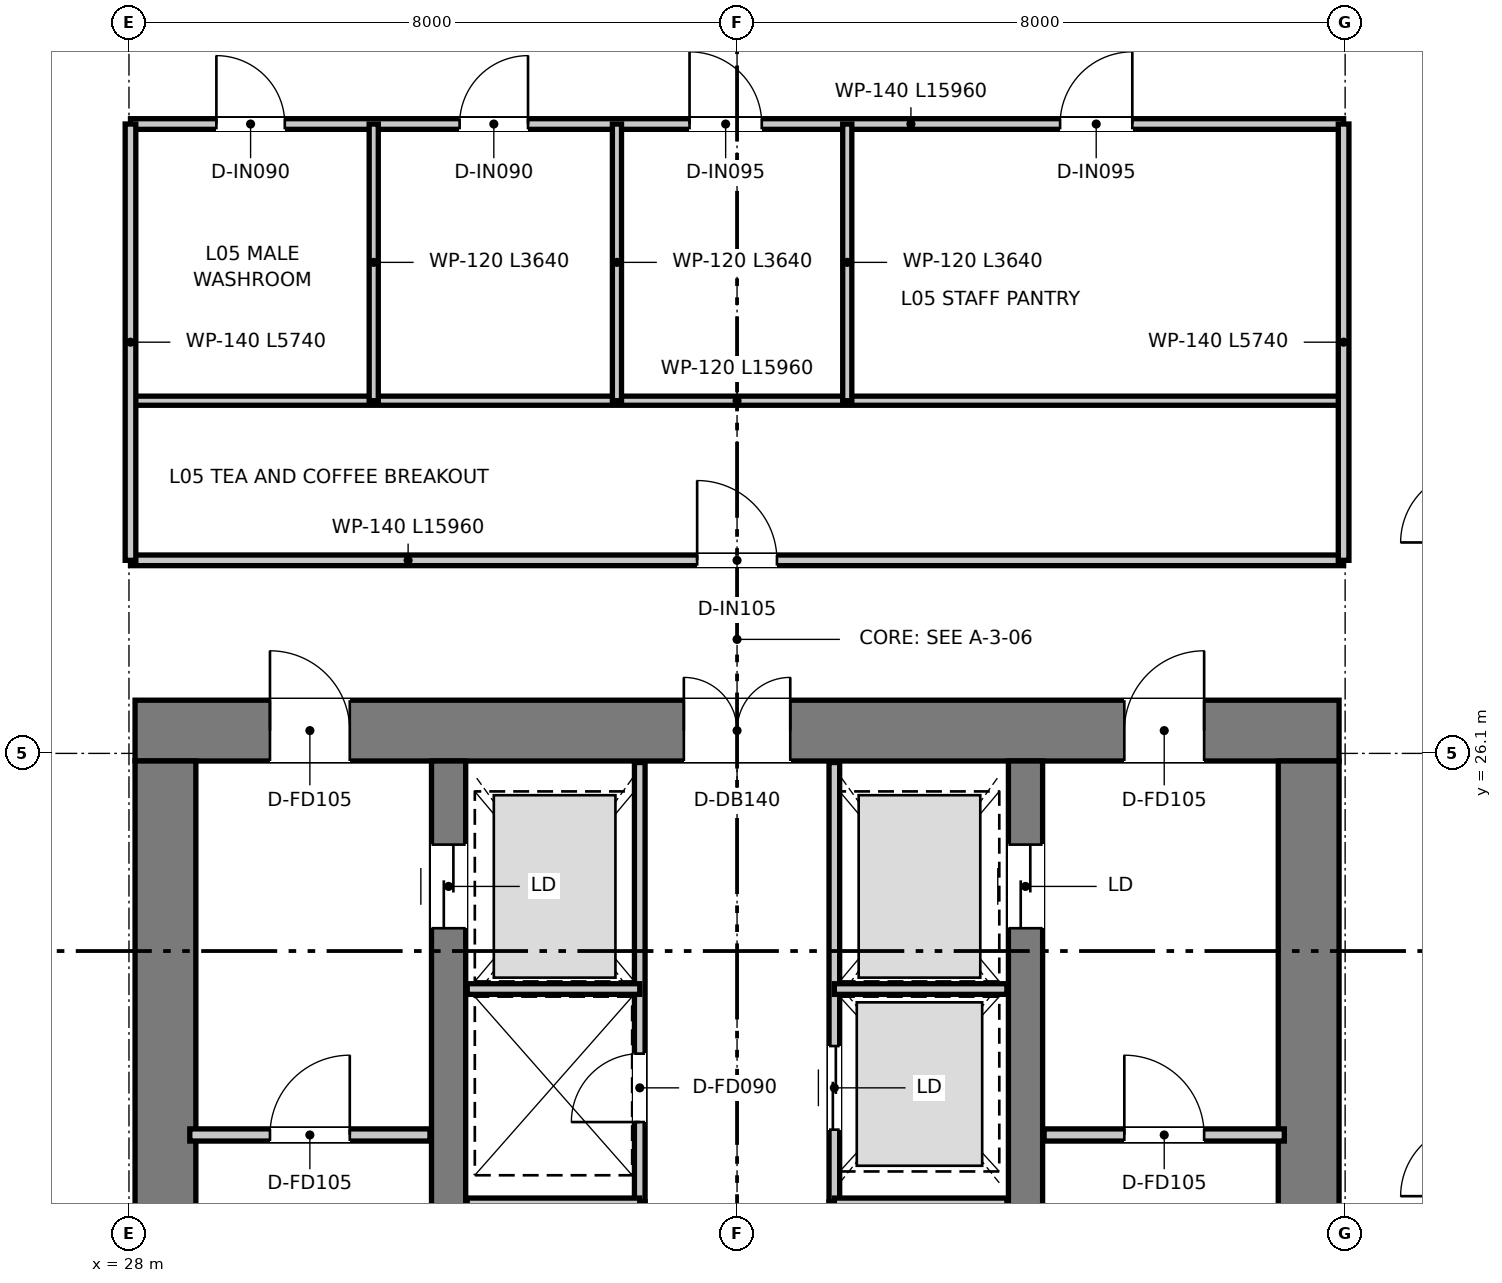
"""IFC4 building model, lengths in metres.
Left out: names, types, materials, properties, quantities, classifications, styles, units other than length and angle.
Written with IfcOpenShell. Run it as: python <this file> out.ifc"""

import sys

from ifc_helpers import new_model, si_unit, direction, frame, frame_2d, origin, place, context, subcontext, project, spatial, rectangle, extrude, element, fill, save


model = new_model("IFC4")
c1 = context("Model", 3, precision=1e-05, world=origin(), true_north=direction((0.0, 1.0)))
c2 = subcontext(c1, "Body", "Model", "MODEL_VIEW")
j1 = project(units=[si_unit("LENGTHUNIT", "METRE"), si_unit("PLANEANGLEUNIT", "RADIAN")], contexts=[c1])
p1 = place(None, origin())
s1 = spatial("IfcSite", under=j1, at=p1, CompositionType="ELEMENT")
p2 = place(p1, origin())
s2 = spatial("IfcBuilding", under=s1, at=p2, CompositionType="ELEMENT")
p3 = place(p2, frame((0.0, 0.0, 25.0)))
s3 = spatial("IfcBuildingStorey", under=s2, at=p3, CompositionType="ELEMENT", Elevation=25.0)
p4 = place(p3, frame((28.08, 26.4, 0.0), z_axis=(0.0, 0.0, 1.0), x_axis=(1.0, 0.0, 0.0)))
e1 = element("IfcWall", 1, at=p4, inside=s3, PredefinedType="SHEAR", context=c2, shape_type="SweptSolid", body=[
    extrude(rectangle(XDim=15.84, YDim=0.8, at=frame_2d((7.92, 0.0))), origin(), (0.0, 0.0, 1.0), 3.95),
])
p5 = place(p4, frame((7.22, 0.0, 0.0)))
e2 = element("IfcOpeningElement", 2, at=p5, cuts=e1, PredefinedType="OPENING", context=c2, shape_type="SweptSolid", body=[
    extrude(rectangle(XDim=1.4, YDim=2.2, at=frame_2d((0.7, 1.1))), frame((0.0, 0.41, 0.0), z_axis=(0.0, -1.0, 0.0), x_axis=(1.0, 0.0, 0.0)), (0.0, 0.0, 1.0), 0.82),
])
p6 = place(p4, frame((1.775, 0.0, 0.0)))
e3 = element("IfcOpeningElement", 3, at=p6, cuts=e1, PredefinedType="OPENING", context=c2, shape_type="SweptSolid", body=[
    extrude(rectangle(XDim=1.05, YDim=2.1, at=frame_2d((0.525, 1.05))), frame((0.0, 0.41, 0.0), z_axis=(0.0, -1.0, 0.0), x_axis=(1.0, 0.0, 0.0)), (0.0, 0.0, 1.0), 0.82),
])
p7 = place(p4, frame((13.015, 0.0, 0.0)))
e4 = element("IfcOpeningElement", 4, at=p7, cuts=e1, PredefinedType="OPENING", context=c2, shape_type="SweptSolid", body=[
    extrude(rectangle(XDim=1.05, YDim=2.1, at=frame_2d((0.525, 1.05))), frame((0.0, 0.41, 0.0), z_axis=(0.0, -1.0, 0.0), x_axis=(1.0, 0.0, 0.0)), (0.0, 0.0, 1.0), 0.82),
])
for number, where, z_axis, x_axis in (
    (5, (28.48, 11.3, 0.0), (0.0, 0.0, 1.0), (0.0, 1.0, 0.0)),
    (6, (43.52, 11.3, 0.0), (0.0, 0.0, 1.0), (0.0, 1.0, 0.0)),
):
    element("IfcWall", number, at=place(p3, frame(where, z_axis=z_axis, x_axis=x_axis)), inside=s3, PredefinedType="SHEAR", context=c2, shape_type="SweptSolid", body=[
        extrude(rectangle(XDim=14.7, YDim=0.8, at=frame_2d((7.35, 0.0))), origin(), (0.0, 0.0, 1.0), 3.95),
    ])
p8 = place(p3, frame((32.205, 13.22, 0.0), z_axis=(0.0, 0.0, 1.0), x_axis=(0.0, 1.0, 0.0)))
e7 = element("IfcWall", 7, at=p8, inside=s3, PredefinedType="SHEAR", context=c2, shape_type="SweptSolid", body=[
    extrude(rectangle(XDim=12.78, YDim=0.45, at=frame_2d((6.39, 0.0))), origin(), (0.0, 0.0, 1.0), 3.95),
])
p9 = place(p8, frame((10.58, 0.0, 0.0)))
e8 = element("IfcOpeningElement", 8, at=p9, cuts=e7, PredefinedType="OPENING", context=c2, shape_type="SweptSolid", body=[
    extrude(rectangle(XDim=1.1, YDim=2.15, at=frame_2d((0.55, 1.075))), frame((0.0, 0.235, 0.0), z_axis=(0.0, -1.0, 0.0), x_axis=(1.0, 0.0, 0.0)), (0.0, 0.0, 1.0), 0.47),
])
p10 = place(p3, frame((39.795, 13.22, 0.0), z_axis=(0.0, 0.0, 1.0), x_axis=(0.0, 1.0, 0.0)))
e9 = element("IfcWall", 9, at=p10, inside=s3, PredefinedType="SHEAR", context=c2, shape_type="SweptSolid", body=[
    extrude(rectangle(XDim=12.78, YDim=0.45, at=frame_2d((6.39, 0.0))), origin(), (0.0, 0.0, 1.0), 3.95),
])
p11 = place(p10, frame((10.58, 0.0, 0.0)))
e10 = element("IfcOpeningElement", 10, at=p11, cuts=e9, PredefinedType="OPENING", context=c2, shape_type="SweptSolid", body=[
    extrude(rectangle(XDim=1.1, YDim=2.15, at=frame_2d((0.55, 1.075))), frame((0.0, 0.235, 0.0), z_axis=(0.0, -1.0, 0.0), x_axis=(1.0, 0.0, 0.0)), (0.0, 0.0, 1.0), 0.47),
])
p12 = place(p3, frame((28.8, 21.08, 0.0), z_axis=(0.0, 0.0, 1.0), x_axis=(1.0, 0.0, 0.0)))
e11 = element("IfcWall", 11, at=p12, inside=s3, PredefinedType="PARTITIONING", context=c2, shape_type="SweptSolid", body=[
    extrude(rectangle(XDim=3.16, YDim=0.16, at=frame_2d((1.58, 0.0))), origin(), (0.0, 0.0, 1.0), 3.67),
])
p13 = place(p12, frame((1.055, 0.0, 0.0)))
e12 = element("IfcOpeningElement", 12, at=p13, cuts=e11, PredefinedType="OPENING", context=c2, shape_type="SweptSolid", body=[
    extrude(rectangle(XDim=1.05, YDim=2.1, at=frame_2d((0.525, 1.05))), frame((0.0, 0.09, 0.0), z_axis=(0.0, -1.0, 0.0), x_axis=(1.0, 0.0, 0.0)), (0.0, 0.0, 1.0), 0.18),
])
p14 = place(p3, frame((40.04, 21.08, 0.0), z_axis=(0.0, 0.0, 1.0), x_axis=(1.0, 0.0, 0.0)))
e13 = element("IfcWall", 13, at=p14, inside=s3, PredefinedType="PARTITIONING", context=c2, shape_type="SweptSolid", body=[
    extrude(rectangle(XDim=3.16, YDim=0.16, at=frame_2d((1.58, 0.0))), origin(), (0.0, 0.0, 1.0), 3.67),
])
p15 = place(p14, frame((1.055, 0.0, 0.0)))
e14 = element("IfcOpeningElement", 14, at=p15, cuts=e13, PredefinedType="OPENING", context=c2, shape_type="SweptSolid", body=[
    extrude(rectangle(XDim=1.05, YDim=2.1, at=frame_2d((0.525, 1.05))), frame((0.0, 0.09, 0.0), z_axis=(0.0, -1.0, 0.0), x_axis=(1.0, 0.0, 0.0)), (0.0, 0.0, 1.0), 0.18),
])
p16 = place(p3, frame((34.72, 20.2, 0.0), z_axis=(0.0, 0.0, 1.0), x_axis=(0.0, 1.0, 0.0)))
e15 = element("IfcWall", 15, at=p16, inside=s3, PredefinedType="PARTITIONING", context=c2, shape_type="SweptSolid", body=[
    extrude(rectangle(XDim=5.78, YDim=0.14, at=frame_2d((2.89, 0.0))), origin(), (0.0, 0.0, 1.0), 2.47),
])
p17 = place(p16, frame((1.05, 0.0, 0.0)))
e16 = element("IfcOpeningElement", 16, at=p17, cuts=e15, PredefinedType="OPENING", context=c2, shape_type="SweptSolid", body=[
    extrude(rectangle(XDim=0.9, YDim=2.1, at=frame_2d((0.45, 1.05))), frame((0.0, 0.08, 0.0), z_axis=(0.0, -1.0, 0.0), x_axis=(1.0, 0.0, 0.0)), (0.0, 0.0, 1.0), 0.16),
])
p18 = place(p3, frame((37.28, 20.2, 0.0), z_axis=(0.0, 0.0, 1.0), x_axis=(0.0, 1.0, 0.0)))
e17 = element("IfcWall", 17, at=p18, inside=s3, PredefinedType="PARTITIONING", context=c2, shape_type="SweptSolid", body=[
    extrude(rectangle(XDim=5.78, YDim=0.14, at=frame_2d((2.89, 0.0))), origin(), (0.0, 0.0, 1.0), 2.47),
])
p19 = place(p18, frame((0.95, 0.0, 0.0)))
e18 = element("IfcOpeningElement", 18, at=p19, cuts=e17, PredefinedType="OPENING", context=c2, shape_type="SweptSolid", body=[
    extrude(rectangle(XDim=1.1, YDim=2.15, at=frame_2d((0.55, 1.075))), frame((0.0, 0.08, 0.0), z_axis=(0.0, -1.0, 0.0), x_axis=(1.0, 0.0, 0.0)), (0.0, 0.0, 1.0), 0.16),
])
for number, where, z_axis, x_axis in (
    (19, (32.45, 23.0, 0.0), (0.0, 0.0, 1.0), (1.0, 0.0, 0.0)),
    (20, (37.28, 23.0, 0.0), (0.0, 0.0, 1.0), (1.0, 0.0, 0.0)),
):
    element("IfcWall", number, at=place(p3, frame(where, z_axis=z_axis, x_axis=x_axis)), inside=s3, PredefinedType="PARTITIONING", context=c2, shape_type="SweptSolid", body=[
        extrude(rectangle(XDim=2.27, YDim=0.14, at=frame_2d((1.135, 0.0))), origin(), (0.0, 0.0, 1.0), 2.47),
    ])
for number, where, z_axis, x_axis in (
    (21, (34.72, 17.78, 0.0), (0.0, 0.0, 1.0), (0.0, 1.0, 0.0)),
    (22, (37.28, 17.78, 0.0), (0.0, 0.0, 1.0), (0.0, 1.0, 0.0)),
):
    element("IfcWall", number, at=place(p3, frame(where, z_axis=z_axis, x_axis=x_axis)), inside=s3, PredefinedType="PARTITIONING", context=c2, shape_type="SweptSolid", body=[
        extrude(rectangle(XDim=2.42, YDim=0.14, at=frame_2d((1.21, 0.0))), origin(), (0.0, 0.0, 1.0), 3.67),
    ])
for number, where, z_axis, x_axis in (
    (23, (32.45, 20.18, 0.0), (0.0, 0.0, 1.0), (1.0, 0.0, 0.0)),
    (24, (37.28, 20.18, 0.0), (0.0, 0.0, 1.0), (1.0, 0.0, 0.0)),
):
    element("IfcWall", number, at=place(p3, frame(where, z_axis=z_axis, x_axis=x_axis)), inside=s3, PredefinedType="PARTITIONING", context=c2, shape_type="SweptSolid", body=[
        extrude(rectangle(XDim=2.27, YDim=0.14, at=frame_2d((1.135, 0.0))), origin(), (0.0, 0.0, 1.0), 3.67),
    ])
p20 = place(p3, frame((28.02, 28.64, 0.0), z_axis=(0.0, 0.0, 1.0), x_axis=(1.0, 0.0, 0.0)))
e25 = element("IfcWall", 25, at=p20, inside=s3, PredefinedType="PARTITIONING", context=c2, shape_type="SweptSolid", body=[
    extrude(rectangle(XDim=15.96, YDim=0.14, at=frame_2d((7.98, 0.0))), origin(), (0.0, 0.0, 1.0), 3.08),
])
p21 = place(p20, frame((7.455, 0.0, 0.0)))
e26 = element("IfcOpeningElement", 26, at=p21, cuts=e25, PredefinedType="OPENING", context=c2, shape_type="SweptSolid", body=[
    extrude(rectangle(XDim=1.05, YDim=2.15, at=frame_2d((0.525, 1.075))), frame((0.0, 0.08, 0.0), z_axis=(0.0, -1.0, 0.0), x_axis=(1.0, 0.0, 0.0)), (0.0, 0.0, 1.0), 0.16),
])
p22 = place(p3, frame((28.02, 30.74, 0.0), z_axis=(0.0, 0.0, 1.0), x_axis=(1.0, 0.0, 0.0)))
e27 = element("IfcWall", 27, at=p22, inside=s3, PredefinedType="PARTITIONING", context=c2, shape_type="SweptSolid", body=[
    extrude(rectangle(XDim=15.96, YDim=0.12, at=frame_2d((7.98, 0.0))), origin(), (0.0, 0.0, 1.0), 3.08),
])
p23 = place(p3, frame((28.02, 34.38, 0.0), z_axis=(0.0, 0.0, 1.0), x_axis=(1.0, 0.0, 0.0)))
e28 = element("IfcWall", 28, at=p23, inside=s3, PredefinedType="PARTITIONING", context=c2, shape_type="SweptSolid", body=[
    extrude(rectangle(XDim=15.96, YDim=0.14, at=frame_2d((7.98, 0.0))), origin(), (0.0, 0.0, 1.0), 3.08),
])
p24 = place(p23, frame((1.13, 0.0, 0.0)))
e29 = element("IfcOpeningElement", 29, at=p24, cuts=e28, PredefinedType="OPENING", context=c2, shape_type="SweptSolid", body=[
    extrude(rectangle(XDim=0.9, YDim=2.1, at=frame_2d((0.45, 1.05))), frame((0.0, 0.08, 0.0), z_axis=(0.0, -1.0, 0.0), x_axis=(1.0, 0.0, 0.0)), (0.0, 0.0, 1.0), 0.16),
])
p25 = place(p23, frame((4.33, 0.0, 0.0)))
e30 = element("IfcOpeningElement", 30, at=p25, cuts=e28, PredefinedType="OPENING", context=c2, shape_type="SweptSolid", body=[
    extrude(rectangle(XDim=0.9, YDim=2.1, at=frame_2d((0.45, 1.05))), frame((0.0, 0.08, 0.0), z_axis=(0.0, -1.0, 0.0), x_axis=(1.0, 0.0, 0.0)), (0.0, 0.0, 1.0), 0.16),
])
p26 = place(p23, frame((7.355, 0.0, 0.0)))
e31 = element("IfcOpeningElement", 31, at=p26, cuts=e28, PredefinedType="OPENING", context=c2, shape_type="SweptSolid", body=[
    extrude(rectangle(XDim=0.95, YDim=2.1, at=frame_2d((0.475, 1.05))), frame((0.0, 0.08, 0.0), z_axis=(0.0, -1.0, 0.0), x_axis=(1.0, 0.0, 0.0)), (0.0, 0.0, 1.0), 0.16),
])
p27 = place(p23, frame((12.23, 0.0, 0.0)))
e32 = element("IfcOpeningElement", 32, at=p27, cuts=e28, PredefinedType="OPENING", context=c2, shape_type="SweptSolid", body=[
    extrude(rectangle(XDim=0.95, YDim=2.1, at=frame_2d((0.475, 1.05))), frame((0.0, 0.08, 0.0), z_axis=(0.0, -1.0, 0.0), x_axis=(1.0, 0.0, 0.0)), (0.0, 0.0, 1.0), 0.16),
])
for number, where, z_axis, x_axis in (
    (33, (28.02, 28.64, 0.0), (0.0, 0.0, 1.0), (0.0, 1.0, 0.0)),
    (34, (43.98, 28.64, 0.0), (0.0, 0.0, 1.0), (0.0, 1.0, 0.0)),
):
    element("IfcWall", number, at=place(p3, frame(where, z_axis=z_axis, x_axis=x_axis)), inside=s3, PredefinedType="PARTITIONING", context=c2, shape_type="SweptSolid", body=[
        extrude(rectangle(XDim=5.74, YDim=0.14, at=frame_2d((2.87, 0.0))), origin(), (0.0, 0.0, 1.0), 3.22),
    ])
for number, where, z_axis, x_axis in (
    (35, (31.22, 30.74, 0.0), (0.0, 0.0, 1.0), (0.0, 1.0, 0.0)),
    (36, (34.42, 30.74, 0.0), (0.0, 0.0, 1.0), (0.0, 1.0, 0.0)),
    (37, (37.45, 30.74, 0.0), (0.0, 0.0, 1.0), (0.0, 1.0, 0.0)),
):
    element("IfcWall", number, at=place(p3, frame(where, z_axis=z_axis, x_axis=x_axis)), inside=s3, PredefinedType="PARTITIONING", context=c2, shape_type="SweptSolid", body=[
        extrude(rectangle(XDim=3.64, YDim=0.12, at=frame_2d((1.82, 0.0))), origin(), (0.0, 0.0, 1.0), 3.12),
    ])
p28 = place(p13, origin())
e38 = element("IfcDoor", 38, at=p28, inside=s3, OperationType="SINGLE_SWING_RIGHT", PredefinedType="DOOR", context=c2, shape_type="SweptSolid", body=[
    extrude(rectangle(XDim=1.05, YDim=2.1, at=frame_2d((0.525, 1.05))), frame((0.0, 0.025, 0.0), z_axis=(0.0, -1.0, 0.0), x_axis=(1.0, 0.0, 0.0)), (0.0, 0.0, 1.0), 0.05),
])
fill(e12, e38)
p29 = place(p15, origin())
e39 = element("IfcDoor", 39, at=p29, inside=s3, OperationType="SINGLE_SWING_LEFT", PredefinedType="DOOR", context=c2, shape_type="SweptSolid", body=[
    extrude(rectangle(XDim=1.05, YDim=2.1, at=frame_2d((0.525, 1.05))), frame((0.0, 0.025, 0.0), z_axis=(0.0, -1.0, 0.0), x_axis=(1.0, 0.0, 0.0)), (0.0, 0.0, 1.0), 0.05),
])
fill(e14, e39)
p30 = place(p5, origin())
e40 = element("IfcDoor", 40, at=p30, inside=s3, OperationType="DOUBLE_DOOR_SINGLE_SWING", PredefinedType="DOOR", context=c2, shape_type="SweptSolid", body=[
    extrude(rectangle(XDim=1.4, YDim=2.2, at=frame_2d((0.7, 1.1))), frame((0.0, 0.025, 0.0), z_axis=(0.0, -1.0, 0.0), x_axis=(1.0, 0.0, 0.0)), (0.0, 0.0, 1.0), 0.05),
])
fill(e2, e40)
p31 = place(p6, origin())
e41 = element("IfcDoor", 41, at=p31, inside=s3, OperationType="SINGLE_SWING_LEFT", PredefinedType="DOOR", context=c2, shape_type="SweptSolid", body=[
    extrude(rectangle(XDim=1.05, YDim=2.1, at=frame_2d((0.525, 1.05))), frame((0.0, 0.025, 0.0), z_axis=(0.0, -1.0, 0.0), x_axis=(1.0, 0.0, 0.0)), (0.0, 0.0, 1.0), 0.05),
])
fill(e3, e41)
p32 = place(p7, origin())
e42 = element("IfcDoor", 42, at=p32, inside=s3, OperationType="SINGLE_SWING_RIGHT", PredefinedType="DOOR", context=c2, shape_type="SweptSolid", body=[
    extrude(rectangle(XDim=1.05, YDim=2.1, at=frame_2d((0.525, 1.05))), frame((0.0, 0.025, 0.0), z_axis=(0.0, -1.0, 0.0), x_axis=(1.0, 0.0, 0.0)), (0.0, 0.0, 1.0), 0.05),
])
fill(e4, e42)
p33 = place(p9, origin())
e43 = element("IfcDoor", 43, at=p33, inside=s3, OperationType="DOUBLE_DOOR_SLIDING", PredefinedType="DOOR", context=c2, shape_type="SweptSolid", body=[
    extrude(rectangle(XDim=1.1, YDim=2.15, at=frame_2d((0.55, 1.075))), frame((0.0, 0.025, 0.0), z_axis=(0.0, -1.0, 0.0), x_axis=(1.0, 0.0, 0.0)), (0.0, 0.0, 1.0), 0.05),
])
fill(e8, e43)
p34 = place(p11, origin())
e44 = element("IfcDoor", 44, at=p34, inside=s3, OperationType="DOUBLE_DOOR_SLIDING", PredefinedType="DOOR", context=c2, shape_type="SweptSolid", body=[
    extrude(rectangle(XDim=1.1, YDim=2.15, at=frame_2d((0.55, 1.075))), frame((0.0, 0.025, 0.0), z_axis=(0.0, -1.0, 0.0), x_axis=(1.0, 0.0, 0.0)), (0.0, 0.0, 1.0), 0.05),
])
fill(e10, e44)
p35 = place(p17, origin())
e45 = element("IfcDoor", 45, at=p35, inside=s3, OperationType="SINGLE_SWING_LEFT", PredefinedType="DOOR", context=c2, shape_type="SweptSolid", body=[
    extrude(rectangle(XDim=0.9, YDim=2.1, at=frame_2d((0.45, 1.05))), frame((0.0, 0.025, 0.0), z_axis=(0.0, -1.0, 0.0), x_axis=(1.0, 0.0, 0.0)), (0.0, 0.0, 1.0), 0.05),
])
fill(e16, e45)
p36 = place(p19, origin())
e46 = element("IfcDoor", 46, at=p36, inside=s3, OperationType="DOUBLE_DOOR_SLIDING", PredefinedType="DOOR", context=c2, shape_type="SweptSolid", body=[
    extrude(rectangle(XDim=1.1, YDim=2.15, at=frame_2d((0.55, 1.075))), frame((0.0, 0.025, 0.0), z_axis=(0.0, -1.0, 0.0), x_axis=(1.0, 0.0, 0.0)), (0.0, 0.0, 1.0), 0.05),
])
fill(e18, e46)
p37 = place(p21, origin())
e47 = element("IfcDoor", 47, at=p37, inside=s3, OperationType="SINGLE_SWING_LEFT", PredefinedType="DOOR", context=c2, shape_type="SweptSolid", body=[
    extrude(rectangle(XDim=1.05, YDim=2.15, at=frame_2d((0.525, 1.075))), frame((0.0, 0.025, 0.0), z_axis=(0.0, -1.0, 0.0), x_axis=(1.0, 0.0, 0.0)), (0.0, 0.0, 1.0), 0.05),
])
fill(e26, e47)
p38 = place(p24, origin())
e48 = element("IfcDoor", 48, at=p38, inside=s3, OperationType="SINGLE_SWING_LEFT", PredefinedType="DOOR", context=c2, shape_type="SweptSolid", body=[
    extrude(rectangle(XDim=0.9, YDim=2.1, at=frame_2d((0.45, 1.05))), frame((0.0, 0.025, 0.0), z_axis=(0.0, -1.0, 0.0), x_axis=(1.0, 0.0, 0.0)), (0.0, 0.0, 1.0), 0.05),
])
fill(e29, e48)
p39 = place(p25, origin())
e49 = element("IfcDoor", 49, at=p39, inside=s3, OperationType="SINGLE_SWING_RIGHT", PredefinedType="DOOR", context=c2, shape_type="SweptSolid", body=[
    extrude(rectangle(XDim=0.9, YDim=2.1, at=frame_2d((0.45, 1.05))), frame((0.0, 0.025, 0.0), z_axis=(0.0, -1.0, 0.0), x_axis=(1.0, 0.0, 0.0)), (0.0, 0.0, 1.0), 0.05),
])
fill(e30, e49)
p40 = place(p26, origin())
e50 = element("IfcDoor", 50, at=p40, inside=s3, OperationType="SINGLE_SWING_LEFT", PredefinedType="DOOR", context=c2, shape_type="SweptSolid", body=[
    extrude(rectangle(XDim=0.95, YDim=2.1, at=frame_2d((0.475, 1.05))), frame((0.0, 0.025, 0.0), z_axis=(0.0, -1.0, 0.0), x_axis=(1.0, 0.0, 0.0)), (0.0, 0.0, 1.0), 0.05),
])
fill(e31, e50)
p41 = place(p27, origin())
e51 = element("IfcDoor", 51, at=p41, inside=s3, OperationType="SINGLE_SWING_RIGHT", PredefinedType="DOOR", context=c2, shape_type="SweptSolid", body=[
    extrude(rectangle(XDim=0.95, YDim=2.1, at=frame_2d((0.475, 1.05))), frame((0.0, 0.025, 0.0), z_axis=(0.0, -1.0, 0.0), x_axis=(1.0, 0.0, 0.0)), (0.0, 0.0, 1.0), 0.05),
])
fill(e32, e51)
save(model, sys.argv[1])
